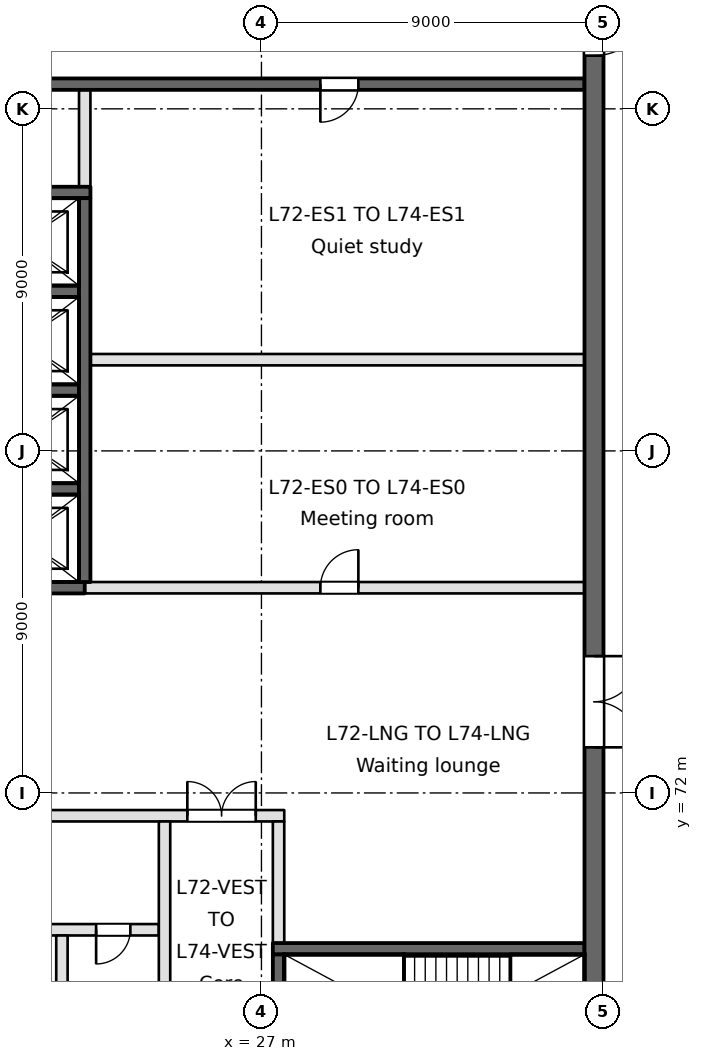
"""IFC4 building model, lengths in metres.
Left out: names, types, materials, properties, quantities, classifications, styles, units other than length and angle.
Written with IfcOpenShell. Run it as: python <this file> out.ifc"""

import sys

from ifc_helpers import new_model, si_unit, direction, frame, frame_2d, origin, place, context, subcontext, project, spatial, rectangle, extrude, element, fill, save


model = new_model("IFC4")
c1 = context("Model", 3, precision=1e-05, world=origin(), true_north=direction((0.0, 1.0)))
c2 = subcontext(c1, "Body", "Model", "MODEL_VIEW")
j1 = project(units=[si_unit("LENGTHUNIT", "METRE"), si_unit("PLANEANGLEUNIT", "RADIAN")], contexts=[c1])
p1 = place(None, origin())
s1 = spatial("IfcSite", under=j1, at=p1, CompositionType="ELEMENT")
p2 = place(p1, origin())
s2 = spatial("IfcBuilding", under=s1, at=p2, CompositionType="ELEMENT")
p3 = place(p2, frame((0.0, 0.0, 280.8)))
s3 = spatial("IfcBuildingStorey", under=s2, at=p3, CompositionType="ELEMENT", Elevation=280.8)
p4 = place(p3, frame((27.3, 67.9, -0.4), z_axis=(0.0, 0.0, 1.0), x_axis=(1.0, 0.0, 0.0)))
e1 = element("IfcWall", 1, at=p4, inside=s3, PredefinedType="SOLIDWALL", context=c2, shape_type="SweptSolid", body=[
    extrude(rectangle(XDim=8.2, YDim=0.3, at=frame_2d((4.1, 0.0))), origin(), (0.0, 0.0, 1.0), 3.7),
])
p5 = place(p3, frame((10.1, 68.4, 0.0), z_axis=(0.0, 0.0, 1.0), x_axis=(1.0, 0.0, 0.0)))
e2 = element("IfcWall", 2, at=p5, inside=s3, PredefinedType="PARTITIONING", context=c2, shape_type="SweptSolid", body=[
    extrude(rectangle(XDim=14.2, YDim=0.3, at=frame_2d((7.1, 0.0))), origin(), (0.0, 0.0, 1.0), 3.3),
])
p6 = place(p5, frame((1.6, 0.0, 0.0)))
e3 = element("IfcOpeningElement", 3, at=p6, cuts=e2, PredefinedType="OPENING", context=c2, shape_type="SweptSolid", body=[
    extrude(rectangle(XDim=0.9, YDim=2.1, at=frame_2d((0.45, 1.05))), frame((0.0, 0.15, 0.0), z_axis=(0.0, -1.0, 0.0), x_axis=(1.0, 0.0, 0.0)), (0.0, 0.0, 1.0), 0.3),
])
p7 = place(p5, frame((5.6, 0.0, 0.0)))
e4 = element("IfcOpeningElement", 4, at=p7, cuts=e2, PredefinedType="OPENING", context=c2, shape_type="SweptSolid", body=[
    extrude(rectangle(XDim=0.9, YDim=2.1, at=frame_2d((0.45, 1.05))), frame((0.0, 0.15, 0.0), z_axis=(0.0, -1.0, 0.0), x_axis=(1.0, 0.0, 0.0)), (0.0, 0.0, 1.0), 0.3),
])
p8 = place(p5, frame((9.25, 0.0, 0.0)))
e5 = element("IfcOpeningElement", 5, at=p8, cuts=e2, PredefinedType="OPENING", context=c2, shape_type="SweptSolid", body=[
    extrude(rectangle(XDim=1.0, YDim=2.1, at=frame_2d((0.5, 1.05))), frame((0.0, 0.15, 0.0), z_axis=(0.0, -1.0, 0.0), x_axis=(1.0, 0.0, 0.0)), (0.0, 0.0, 1.0), 0.3),
])
p9 = place(p5, frame((12.55, 0.0, 0.0)))
e6 = element("IfcOpeningElement", 6, at=p9, cuts=e2, PredefinedType="OPENING", context=c2, shape_type="SweptSolid", body=[
    extrude(rectangle(XDim=0.9, YDim=2.1, at=frame_2d((0.45, 1.05))), frame((0.0, 0.15, 0.0), z_axis=(0.0, -1.0, 0.0), x_axis=(1.0, 0.0, 0.0)), (0.0, 0.0, 1.0), 0.3),
])
p10 = place(p3, frame((9.95, 71.4, 0.0), z_axis=(0.0, 0.0, 1.0), x_axis=(1.0, 0.0, 0.0)))
e7 = element("IfcWall", 7, at=p10, inside=s3, PredefinedType="PARTITIONING", context=c2, shape_type="SweptSolid", body=[
    extrude(rectangle(XDim=17.65, YDim=0.3, at=frame_2d((8.825, 0.0))), origin(), (0.0, 0.0, 1.0), 3.3),
])
p11 = place(p10, frame((15.1, 0.0, 0.0)))
e8 = element("IfcOpeningElement", 8, at=p11, cuts=e7, PredefinedType="OPENING", context=c2, shape_type="SweptSolid", body=[
    extrude(rectangle(XDim=1.8, YDim=2.1, at=frame_2d((0.9, 1.05))), frame((0.0, 0.15, 0.0), z_axis=(0.0, -1.0, 0.0), x_axis=(1.0, 0.0, 0.0)), (0.0, 0.0, 1.0), 0.3),
])
p12 = place(p10, frame((6.65, 0.0, 0.0)))
e9 = element("IfcOpeningElement", 9, at=p12, cuts=e7, PredefinedType="OPENING", context=c2, shape_type="SweptSolid", body=[
    extrude(rectangle(XDim=1.2, YDim=2.1, at=frame_2d((0.6, 1.05))), frame((0.0, 0.15, 0.0), z_axis=(0.0, -1.0, 0.0), x_axis=(1.0, 0.0, 0.0)), (0.0, 0.0, 1.0), 0.3),
])
p13 = place(p3, frame((0.9, 77.4, -0.4), z_axis=(0.0, 0.0, 1.0), x_axis=(1.0, 0.0, 0.0)))
e10 = element("IfcWall", 10, at=p13, inside=s3, PredefinedType="SOLIDWALL", context=c2, shape_type="SweptSolid", body=[
    extrude(rectangle(XDim=21.45, YDim=0.3, at=frame_2d((10.725, 0.0))), origin(), (0.0, 0.0, 1.0), 3.7),
])
p14 = place(p13, frame((15.15, 0.0, 0.4)))
e11 = element("IfcOpeningElement", 11, at=p14, cuts=e10, PredefinedType="OPENING", context=c2, shape_type="SweptSolid", body=[
    extrude(rectangle(XDim=1.8, YDim=2.1, at=frame_2d((0.9, 1.05))), frame((0.0, 0.15, 0.0), z_axis=(0.0, -1.0, 0.0), x_axis=(1.0, 0.0, 0.0)), (0.0, 0.0, 1.0), 0.3),
])
p15 = place(p13, frame((4.75, 0.0, 0.4)))
e12 = element("IfcOpeningElement", 12, at=p15, cuts=e10, PredefinedType="OPENING", context=c2, shape_type="SweptSolid", body=[
    extrude(rectangle(XDim=1.0, YDim=2.1, at=frame_2d((0.5, 1.05))), frame((0.0, 0.15, 0.0), z_axis=(0.0, -1.0, 0.0), x_axis=(1.0, 0.0, 0.0)), (0.0, 0.0, 1.0), 0.3),
])
p16 = place(p3, frame((22.35, 77.4, 0.0), z_axis=(0.0, 0.0, 1.0), x_axis=(1.0, 0.0, 0.0)))
e13 = element("IfcWall", 13, at=p16, inside=s3, PredefinedType="PARTITIONING", context=c2, shape_type="SweptSolid", body=[
    extrude(rectangle(XDim=13.15, YDim=0.3, at=frame_2d((6.575, 0.0))), origin(), (0.0, 0.0, 1.0), 3.3),
])
p17 = place(p16, frame((6.2, 0.0, 0.0)))
e14 = element("IfcOpeningElement", 14, at=p17, cuts=e13, PredefinedType="OPENING", context=c2, shape_type="SweptSolid", body=[
    extrude(rectangle(XDim=1.0, YDim=2.1, at=frame_2d((0.5, 1.05))), frame((0.0, 0.15, 0.0), z_axis=(0.0, -1.0, 0.0), x_axis=(1.0, 0.0, 0.0)), (0.0, 0.0, 1.0), 0.3),
])
for number, where, z_axis, x_axis in (
    (15, (19.2, 80.0, -0.4), (0.0, 0.0, 1.0), (1.0, 0.0, 0.0)),
    (16, (19.2, 82.6, -0.4), (0.0, 0.0, 1.0), (1.0, 0.0, 0.0)),
):
    element("IfcWall", number, at=place(p3, frame(where, z_axis=z_axis, x_axis=x_axis)), inside=s3, PredefinedType="SOLIDWALL", context=c2, shape_type="SweptSolid", body=[
        extrude(rectangle(XDim=3.0, YDim=0.3, at=frame_2d((1.5, 0.0))), origin(), (0.0, 0.0, 1.0), 3.7),
    ])
p18 = place(p3, frame((22.5, 83.4, 0.0), z_axis=(0.0, 0.0, 1.0), x_axis=(1.0, 0.0, 0.0)))
e17 = element("IfcWall", 17, at=p18, inside=s3, PredefinedType="PARTITIONING", context=c2, shape_type="SweptSolid", body=[
    extrude(rectangle(XDim=13.0, YDim=0.3, at=frame_2d((6.5, 0.0))), origin(), (0.0, 0.0, 1.0), 3.3),
])
p19 = place(p3, frame((19.2, 85.2, -0.4), z_axis=(0.0, 0.0, 1.0), x_axis=(1.0, 0.0, 0.0)))
e18 = element("IfcWall", 18, at=p19, inside=s3, PredefinedType="SOLIDWALL", context=c2, shape_type="SweptSolid", body=[
    extrude(rectangle(XDim=3.0, YDim=0.3, at=frame_2d((1.5, 0.0))), origin(), (0.0, 0.0, 1.0), 3.7),
])
p20 = place(p3, frame((11.4, 87.8, -0.4), z_axis=(0.0, 0.0, 1.0), x_axis=(1.0, 0.0, 0.0)))
e19 = element("IfcWall", 19, at=p20, inside=s3, PredefinedType="SOLIDWALL", context=c2, shape_type="SweptSolid", body=[
    extrude(rectangle(XDim=11.1, YDim=0.3, at=frame_2d((5.55, 0.0))), origin(), (0.0, 0.0, 1.0), 3.7),
])
p21 = place(p3, frame((0.9, 90.65, -0.4), z_axis=(0.0, 0.0, 1.0), x_axis=(1.0, 0.0, 0.0)))
e20 = element("IfcWall", 20, at=p21, inside=s3, PredefinedType="SOLIDWALL", context=c2, shape_type="SweptSolid", body=[
    extrude(rectangle(XDim=34.6, YDim=0.3, at=frame_2d((17.3, 0.0))), origin(), (0.0, 0.0, 1.0), 3.7),
])
p22 = place(p21, frame((15.55, 0.0, 0.4)))
e21 = element("IfcOpeningElement", 21, at=p22, cuts=e20, PredefinedType="OPENING", context=c2, shape_type="SweptSolid", body=[
    extrude(rectangle(XDim=1.0, YDim=2.1, at=frame_2d((0.5, 1.05))), frame((0.0, 0.15, 0.0), z_axis=(0.0, -1.0, 0.0), x_axis=(1.0, 0.0, 0.0)), (0.0, 0.0, 1.0), 0.3),
])
p23 = place(p21, frame((4.75, 0.0, 0.4)))
e22 = element("IfcOpeningElement", 22, at=p23, cuts=e20, PredefinedType="OPENING", context=c2, shape_type="SweptSolid", body=[
    extrude(rectangle(XDim=1.0, YDim=2.1, at=frame_2d((0.5, 1.05))), frame((0.0, 0.15, 0.0), z_axis=(0.0, -1.0, 0.0), x_axis=(1.0, 0.0, 0.0)), (0.0, 0.0, 1.0), 0.3),
])
p24 = place(p21, frame((27.65, 0.0, 0.4)))
e23 = element("IfcOpeningElement", 23, at=p24, cuts=e20, PredefinedType="OPENING", context=c2, shape_type="SweptSolid", body=[
    extrude(rectangle(XDim=1.0, YDim=2.1, at=frame_2d((0.5, 1.05))), frame((0.0, 0.15, 0.0), z_axis=(0.0, -1.0, 0.0), x_axis=(1.0, 0.0, 0.0)), (0.0, 0.0, 1.0), 0.3),
])
p25 = place(p3, frame((21.75, 63.5, 0.0), z_axis=(0.0, 0.0, 1.0), x_axis=(0.0, 1.0, 0.0)))
e24 = element("IfcWall", 24, at=p25, inside=s3, PredefinedType="PARTITIONING", context=c2, shape_type="SweptSolid", body=[
    extrude(rectangle(XDim=4.75, YDim=0.3, at=frame_2d((2.375, 0.0))), origin(), (0.0, 0.0, 1.0), 3.3),
])
p26 = place(p3, frame((22.35, 77.55, -0.4), z_axis=(0.0, 0.0, 1.0), x_axis=(0.0, 1.0, 0.0)))
e25 = element("IfcWall", 25, at=p26, inside=s3, PredefinedType="SOLIDWALL", context=c2, shape_type="SweptSolid", body=[
    extrude(rectangle(XDim=10.1, YDim=0.3, at=frame_2d((5.05, 0.0))), origin(), (0.0, 0.0, 1.0), 3.7),
])
p27 = place(p3, frame((22.35, 87.95, 0.0), z_axis=(0.0, 0.0, 1.0), x_axis=(0.0, 1.0, 0.0)))
e26 = element("IfcWall", 26, at=p27, inside=s3, PredefinedType="PARTITIONING", context=c2, shape_type="SweptSolid", body=[
    extrude(rectangle(XDim=2.55, YDim=0.3, at=frame_2d((1.275, 0.0))), origin(), (0.0, 0.0, 1.0), 3.3),
])
p28 = place(p3, frame((24.45, 63.5, 0.0), z_axis=(0.0, 0.0, 1.0), x_axis=(0.0, 1.0, 0.0)))
e27 = element("IfcWall", 27, at=p28, inside=s3, PredefinedType="PARTITIONING", context=c2, shape_type="SweptSolid", body=[
    extrude(rectangle(XDim=7.75, YDim=0.3, at=frame_2d((3.875, 0.0))), origin(), (0.0, 0.0, 1.0), 3.3),
])
p29 = place(p3, frame((27.45, 63.5, -0.4), z_axis=(0.0, 0.0, 1.0), x_axis=(0.0, 1.0, 0.0)))
e28 = element("IfcWall", 28, at=p29, inside=s3, PredefinedType="SOLIDWALL", context=c2, shape_type="SweptSolid", body=[
    extrude(rectangle(XDim=4.25, YDim=0.3, at=frame_2d((2.125, 0.0))), origin(), (0.0, 0.0, 1.0), 3.7),
])
p30 = place(p3, frame((27.45, 68.05, 0.0), z_axis=(0.0, 0.0, 1.0), x_axis=(0.0, 1.0, 0.0)))
e29 = element("IfcWall", 29, at=p30, inside=s3, PredefinedType="PARTITIONING", context=c2, shape_type="SweptSolid", body=[
    extrude(rectangle(XDim=3.2, YDim=0.3, at=frame_2d((1.6, 0.0))), origin(), (0.0, 0.0, 1.0), 3.3),
])
p31 = place(p3, frame((35.75, 63.5, -0.4), z_axis=(0.0, 0.0, 1.0), x_axis=(0.0, 1.0, 0.0)))
e30 = element("IfcWall", 30, at=p31, inside=s3, PredefinedType="SOLIDWALL", context=c2, shape_type="SweptSolid", body=[
    extrude(rectangle(XDim=34.6, YDim=0.5, at=frame_2d((17.3, 0.0))), origin(), (0.0, 0.0, 1.0), 3.7),
])
p32 = place(p31, frame((9.7, 0.0, 0.4)))
e31 = element("IfcOpeningElement", 31, at=p32, cuts=e30, PredefinedType="OPENING", context=c2, shape_type="SweptSolid", body=[
    extrude(rectangle(XDim=2.4, YDim=2.1, at=frame_2d((1.2, 1.05))), frame((0.0, 0.25, 0.0), z_axis=(0.0, -1.0, 0.0), x_axis=(1.0, 0.0, 0.0)), (0.0, 0.0, 1.0), 0.5),
])
p33 = place(p31, frame((27.9, 0.0, 0.4)))
e32 = element("IfcOpeningElement", 32, at=p33, cuts=e30, PredefinedType="OPENING", context=c2, shape_type="SweptSolid", body=[
    extrude(rectangle(XDim=1.5, YDim=2.1, at=frame_2d((0.75, 1.05))), frame((0.0, 0.25, 0.0), z_axis=(0.0, -1.0, 0.0), x_axis=(1.0, 0.0, 0.0)), (0.0, 0.0, 1.0), 0.5),
])
p34 = place(p31, frame((1.5, 0.0, 0.4)))
e33 = element("IfcOpeningElement", 33, at=p34, cuts=e30, PredefinedType="OPENING", context=c2, shape_type="SweptSolid", body=[
    extrude(rectangle(XDim=1.2, YDim=2.1, at=frame_2d((0.6, 1.05))), frame((0.0, 0.25, 0.0), z_axis=(0.0, -1.0, 0.0), x_axis=(1.0, 0.0, 0.0)), (0.0, 0.0, 1.0), 0.5),
])
p35 = place(p32, frame((2.4, 0.0, 0.0), z_axis=(0.0, 0.0, 1.0), x_axis=(-1.0, 0.0, 0.0)))
e34 = element("IfcDoor", 34, at=p35, inside=s3, OperationType="DOUBLE_DOOR_SINGLE_SWING", PredefinedType="DOOR", context=c2, shape_type="SweptSolid", body=[
    extrude(rectangle(XDim=2.4, YDim=2.1, at=frame_2d((1.2, 1.05))), frame((0.0, 0.025, 0.0), z_axis=(0.0, -1.0, 0.0), x_axis=(1.0, 0.0, 0.0)), (0.0, 0.0, 1.0), 0.05),
])
fill(e31, e34)
p36 = place(p33, frame((1.5, 0.0, 0.0), z_axis=(0.0, 0.0, 1.0), x_axis=(-1.0, 0.0, 0.0)))
e35 = element("IfcDoor", 35, at=p36, inside=s3, OperationType="SINGLE_SWING_LEFT", PredefinedType="DOOR", context=c2, shape_type="SweptSolid", body=[
    extrude(rectangle(XDim=1.5, YDim=2.1, at=frame_2d((0.75, 1.05))), frame((0.0, 0.025, 0.0), z_axis=(0.0, -1.0, 0.0), x_axis=(1.0, 0.0, 0.0)), (0.0, 0.0, 1.0), 0.05),
])
fill(e32, e35)
p37 = place(p11, origin())
e36 = element("IfcDoor", 36, at=p37, inside=s3, OperationType="DOUBLE_DOOR_SINGLE_SWING", PredefinedType="DOOR", context=c2, shape_type="SweptSolid", body=[
    extrude(rectangle(XDim=1.8, YDim=2.1, at=frame_2d((0.9, 1.05))), frame((0.0, 0.025, 0.0), z_axis=(0.0, -1.0, 0.0), x_axis=(1.0, 0.0, 0.0)), (0.0, 0.0, 1.0), 0.05),
])
fill(e8, e36)
p38 = place(p9, frame((0.9, 0.0, 0.0), z_axis=(0.0, 0.0, 1.0), x_axis=(-1.0, 0.0, 0.0)))
e37 = element("IfcDoor", 37, at=p38, inside=s3, OperationType="SINGLE_SWING_RIGHT", PredefinedType="DOOR", context=c2, shape_type="SweptSolid", body=[
    extrude(rectangle(XDim=0.9, YDim=2.1, at=frame_2d((0.45, 1.05))), frame((0.0, 0.025, 0.0), z_axis=(0.0, -1.0, 0.0), x_axis=(1.0, 0.0, 0.0)), (0.0, 0.0, 1.0), 0.05),
])
fill(e6, e37)
p39 = place(p17, origin())
e38 = element("IfcDoor", 38, at=p39, inside=s3, OperationType="SINGLE_SWING_RIGHT", PredefinedType="DOOR", context=c2, shape_type="SweptSolid", body=[
    extrude(rectangle(XDim=1.0, YDim=2.1, at=frame_2d((0.5, 1.05))), frame((0.0, 0.025, 0.0), z_axis=(0.0, -1.0, 0.0), x_axis=(1.0, 0.0, 0.0)), (0.0, 0.0, 1.0), 0.05),
])
fill(e14, e38)
p40 = place(p24, frame((1.0, 0.0, 0.0), z_axis=(0.0, 0.0, 1.0), x_axis=(-1.0, 0.0, 0.0)))
e39 = element("IfcDoor", 39, at=p40, inside=s3, OperationType="SINGLE_SWING_RIGHT", PredefinedType="DOOR", context=c2, shape_type="SweptSolid", body=[
    extrude(rectangle(XDim=1.0, YDim=2.1, at=frame_2d((0.5, 1.05))), frame((0.0, 0.025, 0.0), z_axis=(0.0, -1.0, 0.0), x_axis=(1.0, 0.0, 0.0)), (0.0, 0.0, 1.0), 0.05),
])
fill(e23, e39)
save(model, sys.argv[1])
